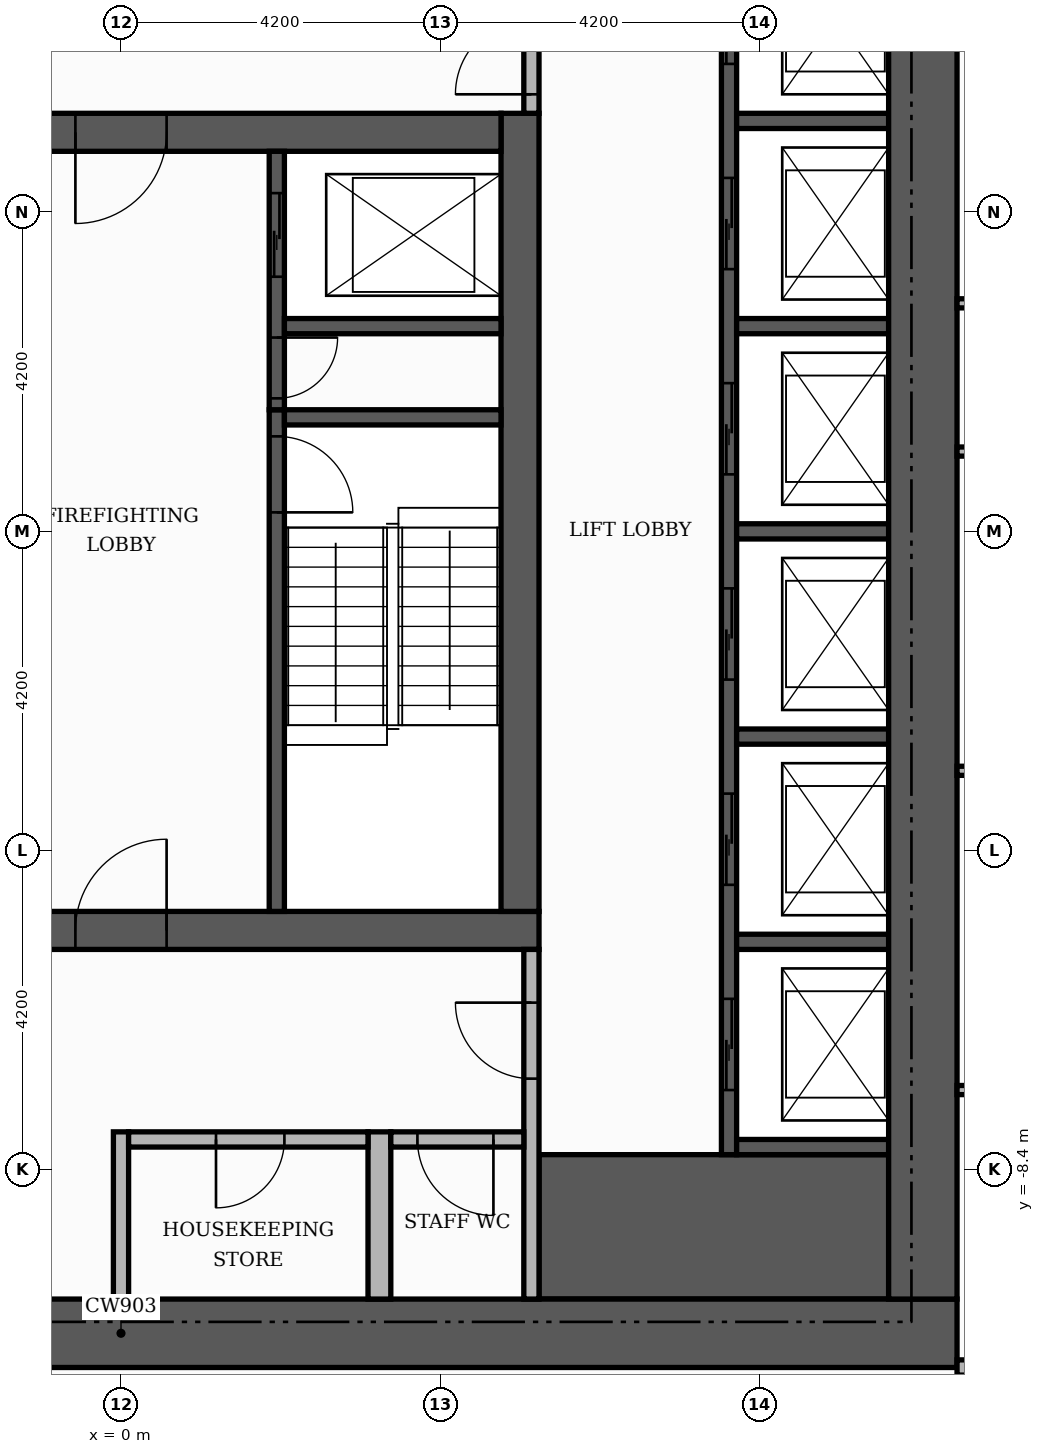
"""IFC4 building model, lengths in metres.
Left out: names, types, materials, properties, quantities, classifications, styles, units other than length and angle.
Written with IfcOpenShell. Run it as: python <this file> out.ifc"""

import sys

from ifc_helpers import new_model, si_unit, direction, frame, frame_2d, origin, place, context, subcontext, project, spatial, rectangle, extrude, element, fill, save


model = new_model("IFC4")
c1 = context("Model", 3, precision=1e-05, world=origin(), true_north=direction((0.0, 1.0)))
c2 = subcontext(c1, "Body", "Model", "MODEL_VIEW")
j1 = project(units=[si_unit("LENGTHUNIT", "METRE"), si_unit("PLANEANGLEUNIT", "RADIAN")], contexts=[c1])
p1 = place(None, origin())
s1 = spatial("IfcSite", under=j1, at=p1, CompositionType="ELEMENT")
p2 = place(p1, origin())
s2 = spatial("IfcBuilding", under=s1, at=p2, CompositionType="ELEMENT")
p3 = place(p2, frame((0.0, 0.0, 165.0)))
s3 = spatial("IfcBuildingStorey", under=s2, at=p3, CompositionType="ELEMENT", Elevation=165.0)
p4 = place(p3, frame((-5.5, -5.25, 0.0), z_axis=(0.0, 0.0, 1.0), x_axis=(1.0, 0.0, 0.0)))
e1 = element("IfcWall", 1, at=p4, inside=s3, PredefinedType="SHEAR", context=c2, shape_type="SweptSolid", body=[
    extrude(rectangle(XDim=11.0, YDim=0.5, at=frame_2d((5.5, 0.0))), origin(), (0.0, 0.0, 1.0), 3.48),
])
p5 = place(p4, frame((4.9, 0.0, 0.0)))
e2 = element("IfcOpeningElement", 2, at=p5, cuts=e1, PredefinedType="OPENING", context=c2, shape_type="SweptSolid", body=[
    extrude(rectangle(XDim=1.2, YDim=2.1, at=frame_2d((0.6, 1.05))), frame((0.0, 0.26, 0.0), z_axis=(0.0, -1.0, 0.0), x_axis=(1.0, 0.0, 0.0)), (0.0, 0.0, 1.0), 0.52),
])
p6 = place(p3, frame((5.25, -5.0, 0.0), z_axis=(0.0, 0.0, 1.0), x_axis=(0.0, 1.0, 0.0)))
e3 = element("IfcWall", 3, at=p6, inside=s3, PredefinedType="SHEAR", context=c2, shape_type="SweptSolid", body=[
    extrude(rectangle(XDim=10.5, YDim=0.5, at=frame_2d((5.25, 0.0))), origin(), (0.0, 0.0, 1.0), 3.48),
])
p7 = place(p3, frame((-5.0, 5.25, 0.0), z_axis=(0.0, 0.0, 1.0), x_axis=(1.0, 0.0, 0.0)))
e4 = element("IfcWall", 4, at=p7, inside=s3, PredefinedType="SHEAR", context=c2, shape_type="SweptSolid", body=[
    extrude(rectangle(XDim=10.0, YDim=0.5, at=frame_2d((5.0, 0.0))), origin(), (0.0, 0.0, 1.0), 3.48),
])
p8 = place(p7, frame((4.4, 0.0, 0.0)))
e5 = element("IfcOpeningElement", 5, at=p8, cuts=e4, PredefinedType="OPENING", context=c2, shape_type="SweptSolid", body=[
    extrude(rectangle(XDim=1.2, YDim=2.1, at=frame_2d((0.6, 1.05))), frame((0.0, 0.26, 0.0), z_axis=(0.0, -1.0, 0.0), x_axis=(1.0, 0.0, 0.0)), (0.0, 0.0, 1.0), 0.52),
])
p9 = place(p3, frame((5.5, -9.15, 0.0), z_axis=(0.0, 0.0, 1.0), x_axis=(1.0, 0.0, 0.0)))
e6 = element("IfcWall", 6, at=p9, inside=s3, PredefinedType="SHEAR", context=c2, shape_type="SweptSolid", body=[
    extrude(rectangle(XDim=4.6, YDim=1.9, at=frame_2d((2.3, 0.0))), origin(), (0.0, 0.0, 1.0), 3.48),
])
p10 = place(p3, frame((2.05, -5.0, 0.0), z_axis=(0.0, 0.0, 1.0), x_axis=(0.0, 1.0, 0.0)))
e7 = element("IfcWall", 7, at=p10, inside=s3, PredefinedType="SHEAR", context=c2, shape_type="SweptSolid", body=[
    extrude(rectangle(XDim=6.6, YDim=0.2, at=frame_2d((3.3, 0.0))), origin(), (0.0, 0.0, 1.0), 3.48),
])
p11 = place(p10, frame((5.25, 0.0, 0.0)))
e8 = element("IfcOpeningElement", 8, at=p11, cuts=e7, PredefinedType="OPENING", context=c2, shape_type="SweptSolid", body=[
    extrude(rectangle(XDim=1.0, YDim=2.1, at=frame_2d((0.5, 1.05))), frame((0.0, 0.11, 0.0), z_axis=(0.0, -1.0, 0.0), x_axis=(1.0, 0.0, 0.0)), (0.0, 0.0, 1.0), 0.22),
])
p12 = place(p3, frame((2.15, 1.5, 0.0), z_axis=(0.0, 0.0, 1.0), x_axis=(1.0, 0.0, 0.0)))
e9 = element("IfcWall", 9, at=p12, inside=s3, PredefinedType="SHEAR", context=c2, shape_type="SweptSolid", body=[
    extrude(rectangle(XDim=2.85, YDim=0.2, at=frame_2d((1.425, 0.0))), origin(), (0.0, 0.0, 1.0), 3.48),
])
p13 = place(p3, frame((8.0, -8.2, 0.0), z_axis=(0.0, 0.0, 1.0), x_axis=(0.0, 1.0, 0.0)))
e10 = element("IfcWall", 10, at=p13, inside=s3, PredefinedType="SHEAR", context=c2, shape_type="SweptSolid", body=[
    extrude(rectangle(XDim=16.4, YDim=0.2, at=frame_2d((8.2, 0.0))), origin(), (0.0, 0.0, 1.0), 3.48),
])
p14 = place(p13, frame((0.85, 0.0, 0.0)))
e11 = element("IfcOpeningElement", 11, at=p14, cuts=e10, PredefinedType="OPENING", context=c2, shape_type="SweptSolid", body=[
    extrude(rectangle(XDim=1.2, YDim=2.1, at=frame_2d((0.6, 1.05))), frame((0.0, 0.11, 0.0), z_axis=(0.0, -1.0, 0.0), x_axis=(1.0, 0.0, 0.0)), (0.0, 0.0, 1.0), 0.22),
])
p15 = place(p13, frame((3.55, 0.0, 0.0)))
e12 = element("IfcOpeningElement", 12, at=p15, cuts=e10, PredefinedType="OPENING", context=c2, shape_type="SweptSolid", body=[
    extrude(rectangle(XDim=1.2, YDim=2.1, at=frame_2d((0.6, 1.05))), frame((0.0, 0.11, 0.0), z_axis=(0.0, -1.0, 0.0), x_axis=(1.0, 0.0, 0.0)), (0.0, 0.0, 1.0), 0.22),
])
p16 = place(p13, frame((6.25, 0.0, 0.0)))
e13 = element("IfcOpeningElement", 13, at=p16, cuts=e10, PredefinedType="OPENING", context=c2, shape_type="SweptSolid", body=[
    extrude(rectangle(XDim=1.2, YDim=2.1, at=frame_2d((0.6, 1.05))), frame((0.0, 0.11, 0.0), z_axis=(0.0, -1.0, 0.0), x_axis=(1.0, 0.0, 0.0)), (0.0, 0.0, 1.0), 0.22),
])
p17 = place(p13, frame((8.95, 0.0, 0.0)))
e14 = element("IfcOpeningElement", 14, at=p17, cuts=e10, PredefinedType="OPENING", context=c2, shape_type="SweptSolid", body=[
    extrude(rectangle(XDim=1.2, YDim=2.1, at=frame_2d((0.6, 1.05))), frame((0.0, 0.11, 0.0), z_axis=(0.0, -1.0, 0.0), x_axis=(1.0, 0.0, 0.0)), (0.0, 0.0, 1.0), 0.22),
])
p18 = place(p13, frame((11.65, 0.0, 0.0)))
e15 = element("IfcOpeningElement", 15, at=p18, cuts=e10, PredefinedType="OPENING", context=c2, shape_type="SweptSolid", body=[
    extrude(rectangle(XDim=1.2, YDim=2.1, at=frame_2d((0.6, 1.05))), frame((0.0, 0.11, 0.0), z_axis=(0.0, -1.0, 0.0), x_axis=(1.0, 0.0, 0.0)), (0.0, 0.0, 1.0), 0.22),
])
p19 = place(p13, frame((14.35, 0.0, 0.0)))
e16 = element("IfcOpeningElement", 16, at=p19, cuts=e10, PredefinedType="OPENING", context=c2, shape_type="SweptSolid", body=[
    extrude(rectangle(XDim=1.2, YDim=2.1, at=frame_2d((0.6, 1.05))), frame((0.0, 0.11, 0.0), z_axis=(0.0, -1.0, 0.0), x_axis=(1.0, 0.0, 0.0)), (0.0, 0.0, 1.0), 0.22),
])
for number, where, z_axis, x_axis in (
    (17, (8.1, -8.1, 0.0), (0.0, 0.0, 1.0), (1.0, 0.0, 0.0)),
    (18, (8.1, -5.4, 0.0), (0.0, 0.0, 1.0), (1.0, 0.0, 0.0)),
    (19, (8.1, -2.7, 0.0), (0.0, 0.0, 1.0), (1.0, 0.0, 0.0)),
    (20, (8.1, 0.0, 0.0), (0.0, 0.0, 1.0), (1.0, 0.0, 0.0)),
):
    element("IfcWall", number, at=place(p3, frame(where, z_axis=z_axis, x_axis=x_axis)), inside=s3, PredefinedType="SHEAR", context=c2, shape_type="SweptSolid", body=[
        extrude(rectangle(XDim=2.0, YDim=0.2, at=frame_2d((1.0, 0.0))), origin(), (0.0, 0.0, 1.0), 3.48),
    ])
p20 = place(p3, frame((2.05, 1.6, 0.0), z_axis=(0.0, 0.0, 1.0), x_axis=(0.0, 1.0, 0.0)))
e21 = element("IfcWall", 21, at=p20, inside=s3, PredefinedType="SHEAR", context=c2, shape_type="SweptSolid", body=[
    extrude(rectangle(XDim=3.4, YDim=0.2, at=frame_2d((1.7, 0.0))), origin(), (0.0, 0.0, 1.0), 3.48),
])
p21 = place(p20, frame((1.75, 0.0, 0.0)))
e22 = element("IfcOpeningElement", 22, at=p21, cuts=e21, PredefinedType="OPENING", context=c2, shape_type="SweptSolid", body=[
    extrude(rectangle(XDim=1.1, YDim=2.1, at=frame_2d((0.55, 1.05))), frame((0.0, 0.11, 0.0), z_axis=(0.0, -1.0, 0.0), x_axis=(1.0, 0.0, 0.0)), (0.0, 0.0, 1.0), 0.22),
])
p22 = place(p20, frame((0.15, 0.0, 0.0)))
e23 = element("IfcOpeningElement", 23, at=p22, cuts=e21, PredefinedType="OPENING", context=c2, shape_type="SweptSolid", body=[
    extrude(rectangle(XDim=0.8, YDim=2.1, at=frame_2d((0.4, 1.05))), frame((0.0, 0.11, 0.0), z_axis=(0.0, -1.0, 0.0), x_axis=(1.0, 0.0, 0.0)), (0.0, 0.0, 1.0), 0.22),
])
p23 = place(p3, frame((2.15, 2.7, 0.0), z_axis=(0.0, 0.0, 1.0), x_axis=(1.0, 0.0, 0.0)))
e24 = element("IfcWall", 24, at=p23, inside=s3, PredefinedType="SHEAR", context=c2, shape_type="SweptSolid", body=[
    extrude(rectangle(XDim=2.85, YDim=0.2, at=frame_2d((1.425, 0.0))), origin(), (0.0, 0.0, 1.0), 3.48),
])
for number, where, z_axis, x_axis in (
    (25, (8.1, 2.7, 0.0), (0.0, 0.0, 1.0), (1.0, 0.0, 0.0)),
    (26, (8.1, 5.4, 0.0), (0.0, 0.0, 1.0), (1.0, 0.0, 0.0)),
):
    element("IfcWall", number, at=place(p3, frame(where, z_axis=z_axis, x_axis=x_axis)), inside=s3, PredefinedType="SHEAR", context=c2, shape_type="SweptSolid", body=[
        extrude(rectangle(XDim=2.0, YDim=0.2, at=frame_2d((1.0, 0.0))), origin(), (0.0, 0.0, 1.0), 3.48),
    ])
p24 = place(p3, frame((-11.0, -10.55, 0.0), z_axis=(0.0, 0.0, 1.0), x_axis=(1.0, 0.0, 0.0)))
e27 = element("IfcWall", 27, at=p24, inside=s3, PredefinedType="SHEAR", context=c2, shape_type="SweptSolid", body=[
    extrude(rectangle(XDim=22.0, YDim=0.9, at=frame_2d((11.0, 0.0))), origin(), (0.0, 0.0, 1.0), 3.48),
])
p25 = place(p24, frame((7.4, 0.0, 0.0)))
e28 = element("IfcOpeningElement", 28, at=p25, cuts=e27, PredefinedType="OPENING", context=c2, shape_type="SweptSolid", body=[
    extrude(rectangle(XDim=1.8, YDim=2.2, at=frame_2d((0.9, 1.1))), frame((0.0, 0.46, 0.0), z_axis=(0.0, -1.0, 0.0), x_axis=(1.0, 0.0, 0.0)), (0.0, 0.0, 1.0), 0.92),
])
p26 = place(p3, frame((10.55, -10.1, 0.0), z_axis=(0.0, 0.0, 1.0), x_axis=(0.0, 1.0, 0.0)))
e29 = element("IfcWall", 29, at=p26, inside=s3, PredefinedType="SHEAR", context=c2, shape_type="SweptSolid", body=[
    extrude(rectangle(XDim=20.2, YDim=0.9, at=frame_2d((10.1, 0.0))), origin(), (0.0, 0.0, 1.0), 3.48),
])
p27 = place(p3, frame((0.0, -10.1, 0.0), z_axis=(0.0, 0.0, 1.0), x_axis=(0.0, 1.0, 0.0)))
e30 = element("IfcWall", 30, at=p27, inside=s3, PredefinedType="PARTITIONING", context=c2, shape_type="SweptSolid", body=[
    extrude(rectangle(XDim=2.2, YDim=0.2, at=frame_2d((1.1, 0.0))), origin(), (0.0, 0.0, 1.0), 3.48),
])
p28 = place(p3, frame((3.4, -10.1, 0.0), z_axis=(0.0, 0.0, 1.0), x_axis=(0.0, 1.0, 0.0)))
e31 = element("IfcWall", 31, at=p28, inside=s3, PredefinedType="PARTITIONING", context=c2, shape_type="SweptSolid", body=[
    extrude(rectangle(XDim=2.2, YDim=0.3, at=frame_2d((1.1, 0.0))), origin(), (0.0, 0.0, 1.0), 3.48),
])
p29 = place(p3, frame((5.4, -10.1, 0.0), z_axis=(0.0, 0.0, 1.0), x_axis=(0.0, 1.0, 0.0)))
e32 = element("IfcWall", 32, at=p29, inside=s3, PredefinedType="PARTITIONING", context=c2, shape_type="SweptSolid", body=[
    extrude(rectangle(XDim=4.6, YDim=0.2, at=frame_2d((2.3, 0.0))), origin(), (0.0, 0.0, 1.0), 3.48),
])
p30 = place(p29, frame((2.9, 0.0, 0.0)))
e33 = element("IfcOpeningElement", 33, at=p30, cuts=e32, PredefinedType="OPENING", context=c2, shape_type="SweptSolid", body=[
    extrude(rectangle(XDim=1.0, YDim=2.1, at=frame_2d((0.5, 1.05))), frame((0.0, 0.11, 0.0), z_axis=(0.0, -1.0, 0.0), x_axis=(1.0, 0.0, 0.0)), (0.0, 0.0, 1.0), 0.22),
])
p31 = place(p3, frame((0.1, -8.0, 0.0), z_axis=(0.0, 0.0, 1.0), x_axis=(1.0, 0.0, 0.0)))
e34 = element("IfcWall", 34, at=p31, inside=s3, PredefinedType="PARTITIONING", context=c2, shape_type="SweptSolid", body=[
    extrude(rectangle(XDim=3.15, YDim=0.2, at=frame_2d((1.575, 0.0))), origin(), (0.0, 0.0, 1.0), 3.48),
])
p32 = place(p31, frame((1.15, 0.0, 0.0)))
e35 = element("IfcOpeningElement", 35, at=p32, cuts=e34, PredefinedType="OPENING", context=c2, shape_type="SweptSolid", body=[
    extrude(rectangle(XDim=0.9, YDim=2.1, at=frame_2d((0.45, 1.05))), frame((0.0, 0.11, 0.0), z_axis=(0.0, -1.0, 0.0), x_axis=(1.0, 0.0, 0.0)), (0.0, 0.0, 1.0), 0.22),
])
p33 = place(p3, frame((3.55, -8.0, 0.0), z_axis=(0.0, 0.0, 1.0), x_axis=(1.0, 0.0, 0.0)))
e36 = element("IfcWall", 36, at=p33, inside=s3, PredefinedType="PARTITIONING", context=c2, shape_type="SweptSolid", body=[
    extrude(rectangle(XDim=1.75, YDim=0.2, at=frame_2d((0.875, 0.0))), origin(), (0.0, 0.0, 1.0), 3.48),
])
p34 = place(p33, frame((0.35, 0.0, 0.0)))
e37 = element("IfcOpeningElement", 37, at=p34, cuts=e36, PredefinedType="OPENING", context=c2, shape_type="SweptSolid", body=[
    extrude(rectangle(XDim=1.0, YDim=2.1, at=frame_2d((0.5, 1.05))), frame((0.0, 0.11, 0.0), z_axis=(0.0, -1.0, 0.0), x_axis=(1.0, 0.0, 0.0)), (0.0, 0.0, 1.0), 0.22),
])
p35 = place(p3, frame((5.4, 5.5, 0.0), z_axis=(0.0, 0.0, 1.0), x_axis=(0.0, 1.0, 0.0)))
e38 = element("IfcWall", 38, at=p35, inside=s3, PredefinedType="PARTITIONING", context=c2, shape_type="SweptSolid", body=[
    extrude(rectangle(XDim=4.6, YDim=0.2, at=frame_2d((2.3, 0.0))), origin(), (0.0, 0.0, 1.0), 3.48),
])
p36 = place(p35, frame((0.25, 0.0, 0.0)))
e39 = element("IfcOpeningElement", 39, at=p36, cuts=e38, PredefinedType="OPENING", context=c2, shape_type="SweptSolid", body=[
    extrude(rectangle(XDim=1.0, YDim=2.1, at=frame_2d((0.5, 1.05))), frame((0.0, 0.11, 0.0), z_axis=(0.0, -1.0, 0.0), x_axis=(1.0, 0.0, 0.0)), (0.0, 0.0, 1.0), 0.22),
])
p37 = place(p3, frame((11.0, -11.0, 0.0), z_axis=(0.0, 0.0, 1.0), x_axis=(1.0, 0.0, 0.0)))
e40 = element("IfcWall", 40, at=p37, inside=s3, PredefinedType="PARTITIONING", context=c2, shape_type="SweptSolid", body=[
    extrude(rectangle(XDim=2.65, YDim=0.2, at=frame_2d((1.325, 0.0))), origin(), (0.0, 0.0, 1.0), 3.48),
])
p38 = place(p37, frame((0.775, 0.0, 0.0)))
e41 = element("IfcOpeningElement", 41, at=p38, cuts=e40, PredefinedType="OPENING", context=c2, shape_type="SweptSolid", body=[
    extrude(rectangle(XDim=1.1, YDim=2.4, at=frame_2d((0.55, 1.2))), frame((0.0, 0.11, 0.0), z_axis=(0.0, -1.0, 0.0), x_axis=(1.0, 0.0, 0.0)), (0.0, 0.0, 1.0), 0.22),
])
p39 = place(p3, frame((11.0, -7.35, 0.0), z_axis=(0.0, 0.0, 1.0), x_axis=(1.0, 0.0, 0.0)))
e42 = element("IfcWall", 42, at=p39, inside=s3, PredefinedType="PARTITIONING", context=c2, shape_type="SweptSolid", body=[
    extrude(rectangle(XDim=8.22, YDim=0.12, at=frame_2d((4.11, 0.0))), origin(), (0.0, 0.0, 1.0), 3.48),
])
p40 = place(p39, frame((3.66, 0.0, 0.0)))
e43 = element("IfcOpeningElement", 43, at=p40, cuts=e42, PredefinedType="OPENING", context=c2, shape_type="SweptSolid", body=[
    extrude(rectangle(XDim=0.9, YDim=2.1, at=frame_2d((0.45, 1.05))), frame((0.0, 0.07, 0.0), z_axis=(0.0, -1.0, 0.0), x_axis=(1.0, 0.0, 0.0)), (0.0, 0.0, 1.0), 0.14),
])
for number, where, z_axis, x_axis in (
    (44, (11.0, -3.15, 0.0), (0.0, 0.0, 1.0), (1.0, 0.0, 0.0)),
    (45, (11.0, 1.05, 0.0), (0.0, 0.0, 1.0), (1.0, 0.0, 0.0)),
    (46, (11.0, 3.0, 0.0), (0.0, 0.0, 1.0), (1.0, 0.0, 0.0)),
):
    element("IfcWall", number, at=place(p3, frame(where, z_axis=z_axis, x_axis=x_axis)), inside=s3, PredefinedType="PARTITIONING", context=c2, shape_type="SweptSolid", body=[
        extrude(rectangle(XDim=8.22, YDim=0.12, at=frame_2d((4.11, 0.0))), origin(), (0.0, 0.0, 1.0), 3.48),
    ])
p41 = place(p14, origin())
e47 = element("IfcDoor", 47, at=p41, inside=s3, OperationType="SLIDING_TO_LEFT", PredefinedType="DOOR", context=c2, shape_type="SweptSolid", body=[
    extrude(rectangle(XDim=1.2, YDim=2.1, at=frame_2d((0.6, 1.05))), frame((0.0, 0.025, 0.0), z_axis=(0.0, -1.0, 0.0), x_axis=(1.0, 0.0, 0.0)), (0.0, 0.0, 1.0), 0.05),
])
fill(e11, e47)
p42 = place(p15, origin())
e48 = element("IfcDoor", 48, at=p42, inside=s3, OperationType="SLIDING_TO_LEFT", PredefinedType="DOOR", context=c2, shape_type="SweptSolid", body=[
    extrude(rectangle(XDim=1.2, YDim=2.1, at=frame_2d((0.6, 1.05))), frame((0.0, 0.025, 0.0), z_axis=(0.0, -1.0, 0.0), x_axis=(1.0, 0.0, 0.0)), (0.0, 0.0, 1.0), 0.05),
])
fill(e12, e48)
p43 = place(p16, origin())
e49 = element("IfcDoor", 49, at=p43, inside=s3, OperationType="SLIDING_TO_LEFT", PredefinedType="DOOR", context=c2, shape_type="SweptSolid", body=[
    extrude(rectangle(XDim=1.2, YDim=2.1, at=frame_2d((0.6, 1.05))), frame((0.0, 0.025, 0.0), z_axis=(0.0, -1.0, 0.0), x_axis=(1.0, 0.0, 0.0)), (0.0, 0.0, 1.0), 0.05),
])
fill(e13, e49)
p44 = place(p17, origin())
e50 = element("IfcDoor", 50, at=p44, inside=s3, OperationType="SLIDING_TO_LEFT", PredefinedType="DOOR", context=c2, shape_type="SweptSolid", body=[
    extrude(rectangle(XDim=1.2, YDim=2.1, at=frame_2d((0.6, 1.05))), frame((0.0, 0.025, 0.0), z_axis=(0.0, -1.0, 0.0), x_axis=(1.0, 0.0, 0.0)), (0.0, 0.0, 1.0), 0.05),
])
fill(e14, e50)
p45 = place(p18, origin())
e51 = element("IfcDoor", 51, at=p45, inside=s3, OperationType="SLIDING_TO_LEFT", PredefinedType="DOOR", context=c2, shape_type="SweptSolid", body=[
    extrude(rectangle(XDim=1.2, YDim=2.1, at=frame_2d((0.6, 1.05))), frame((0.0, 0.025, 0.0), z_axis=(0.0, -1.0, 0.0), x_axis=(1.0, 0.0, 0.0)), (0.0, 0.0, 1.0), 0.05),
])
fill(e15, e51)
p46 = place(p19, origin())
e52 = element("IfcDoor", 52, at=p46, inside=s3, OperationType="SLIDING_TO_LEFT", PredefinedType="DOOR", context=c2, shape_type="SweptSolid", body=[
    extrude(rectangle(XDim=1.2, YDim=2.1, at=frame_2d((0.6, 1.05))), frame((0.0, 0.025, 0.0), z_axis=(0.0, -1.0, 0.0), x_axis=(1.0, 0.0, 0.0)), (0.0, 0.0, 1.0), 0.05),
])
fill(e16, e52)
p47 = place(p21, origin())
e53 = element("IfcDoor", 53, at=p47, inside=s3, OperationType="SLIDING_TO_LEFT", PredefinedType="DOOR", context=c2, shape_type="SweptSolid", body=[
    extrude(rectangle(XDim=1.1, YDim=2.1, at=frame_2d((0.55, 1.05))), frame((0.0, 0.025, 0.0), z_axis=(0.0, -1.0, 0.0), x_axis=(1.0, 0.0, 0.0)), (0.0, 0.0, 1.0), 0.05),
])
fill(e22, e53)
p48 = place(p11, frame((1.0, 0.0, 0.0), z_axis=(0.0, 0.0, 1.0), x_axis=(-1.0, 0.0, 0.0)))
e54 = element("IfcDoor", 54, at=p48, inside=s3, OperationType="SINGLE_SWING_LEFT", PredefinedType="DOOR", context=c2, shape_type="SweptSolid", body=[
    extrude(rectangle(XDim=1.0, YDim=2.1, at=frame_2d((0.5, 1.05))), frame((0.0, 0.025, 0.0), z_axis=(0.0, -1.0, 0.0), x_axis=(1.0, 0.0, 0.0)), (0.0, 0.0, 1.0), 0.05),
])
fill(e8, e54)
p49 = place(p22, frame((0.8, 0.0, 0.0), z_axis=(0.0, 0.0, 1.0), x_axis=(-1.0, 0.0, 0.0)))
e55 = element("IfcDoor", 55, at=p49, inside=s3, OperationType="SINGLE_SWING_RIGHT", PredefinedType="DOOR", context=c2, shape_type="SweptSolid", body=[
    extrude(rectangle(XDim=0.8, YDim=2.1, at=frame_2d((0.4, 1.05))), frame((0.0, 0.025, 0.0), z_axis=(0.0, -1.0, 0.0), x_axis=(1.0, 0.0, 0.0)), (0.0, 0.0, 1.0), 0.05),
])
fill(e23, e55)
p50 = place(p8, frame((1.2, 0.0, 0.0), z_axis=(0.0, 0.0, 1.0), x_axis=(-1.0, 0.0, 0.0)))
e56 = element("IfcDoor", 56, at=p50, inside=s3, OperationType="SINGLE_SWING_LEFT", PredefinedType="DOOR", context=c2, shape_type="SweptSolid", body=[
    extrude(rectangle(XDim=1.2, YDim=2.1, at=frame_2d((0.6, 1.05))), frame((0.0, 0.025, 0.0), z_axis=(0.0, -1.0, 0.0), x_axis=(1.0, 0.0, 0.0)), (0.0, 0.0, 1.0), 0.05),
])
fill(e5, e56)
p51 = place(p5, origin())
e57 = element("IfcDoor", 57, at=p51, inside=s3, OperationType="SINGLE_SWING_RIGHT", PredefinedType="DOOR", context=c2, shape_type="SweptSolid", body=[
    extrude(rectangle(XDim=1.2, YDim=2.1, at=frame_2d((0.6, 1.05))), frame((0.0, 0.025, 0.0), z_axis=(0.0, -1.0, 0.0), x_axis=(1.0, 0.0, 0.0)), (0.0, 0.0, 1.0), 0.05),
])
fill(e2, e57)
p52 = place(p36, origin())
e58 = element("IfcDoor", 58, at=p52, inside=s3, OperationType="SINGLE_SWING_LEFT", PredefinedType="DOOR", context=c2, shape_type="SweptSolid", body=[
    extrude(rectangle(XDim=1.0, YDim=2.1, at=frame_2d((0.5, 1.05))), frame((0.0, 0.025, 0.0), z_axis=(0.0, -1.0, 0.0), x_axis=(1.0, 0.0, 0.0)), (0.0, 0.0, 1.0), 0.05),
])
fill(e39, e58)
p53 = place(p30, origin())
e59 = element("IfcDoor", 59, at=p53, inside=s3, OperationType="SINGLE_SWING_RIGHT", PredefinedType="DOOR", context=c2, shape_type="SweptSolid", body=[
    extrude(rectangle(XDim=1.0, YDim=2.1, at=frame_2d((0.5, 1.05))), frame((0.0, 0.025, 0.0), z_axis=(0.0, -1.0, 0.0), x_axis=(1.0, 0.0, 0.0)), (0.0, 0.0, 1.0), 0.05),
])
fill(e33, e59)
p54 = place(p32, frame((0.9, 0.0, 0.0), z_axis=(0.0, 0.0, 1.0), x_axis=(-1.0, 0.0, 0.0)))
e60 = element("IfcDoor", 60, at=p54, inside=s3, OperationType="SINGLE_SWING_LEFT", PredefinedType="DOOR", context=c2, shape_type="SweptSolid", body=[
    extrude(rectangle(XDim=0.9, YDim=2.1, at=frame_2d((0.45, 1.05))), frame((0.0, 0.025, 0.0), z_axis=(0.0, -1.0, 0.0), x_axis=(1.0, 0.0, 0.0)), (0.0, 0.0, 1.0), 0.05),
])
fill(e35, e60)
p55 = place(p34, frame((1.0, 0.0, 0.0), z_axis=(0.0, 0.0, 1.0), x_axis=(-1.0, 0.0, 0.0)))
e61 = element("IfcDoor", 61, at=p55, inside=s3, OperationType="SINGLE_SWING_RIGHT", PredefinedType="DOOR", context=c2, shape_type="SweptSolid", body=[
    extrude(rectangle(XDim=1.0, YDim=2.1, at=frame_2d((0.5, 1.05))), frame((0.0, 0.025, 0.0), z_axis=(0.0, -1.0, 0.0), x_axis=(1.0, 0.0, 0.0)), (0.0, 0.0, 1.0), 0.05),
])
fill(e37, e61)
save(model, sys.argv[1])
